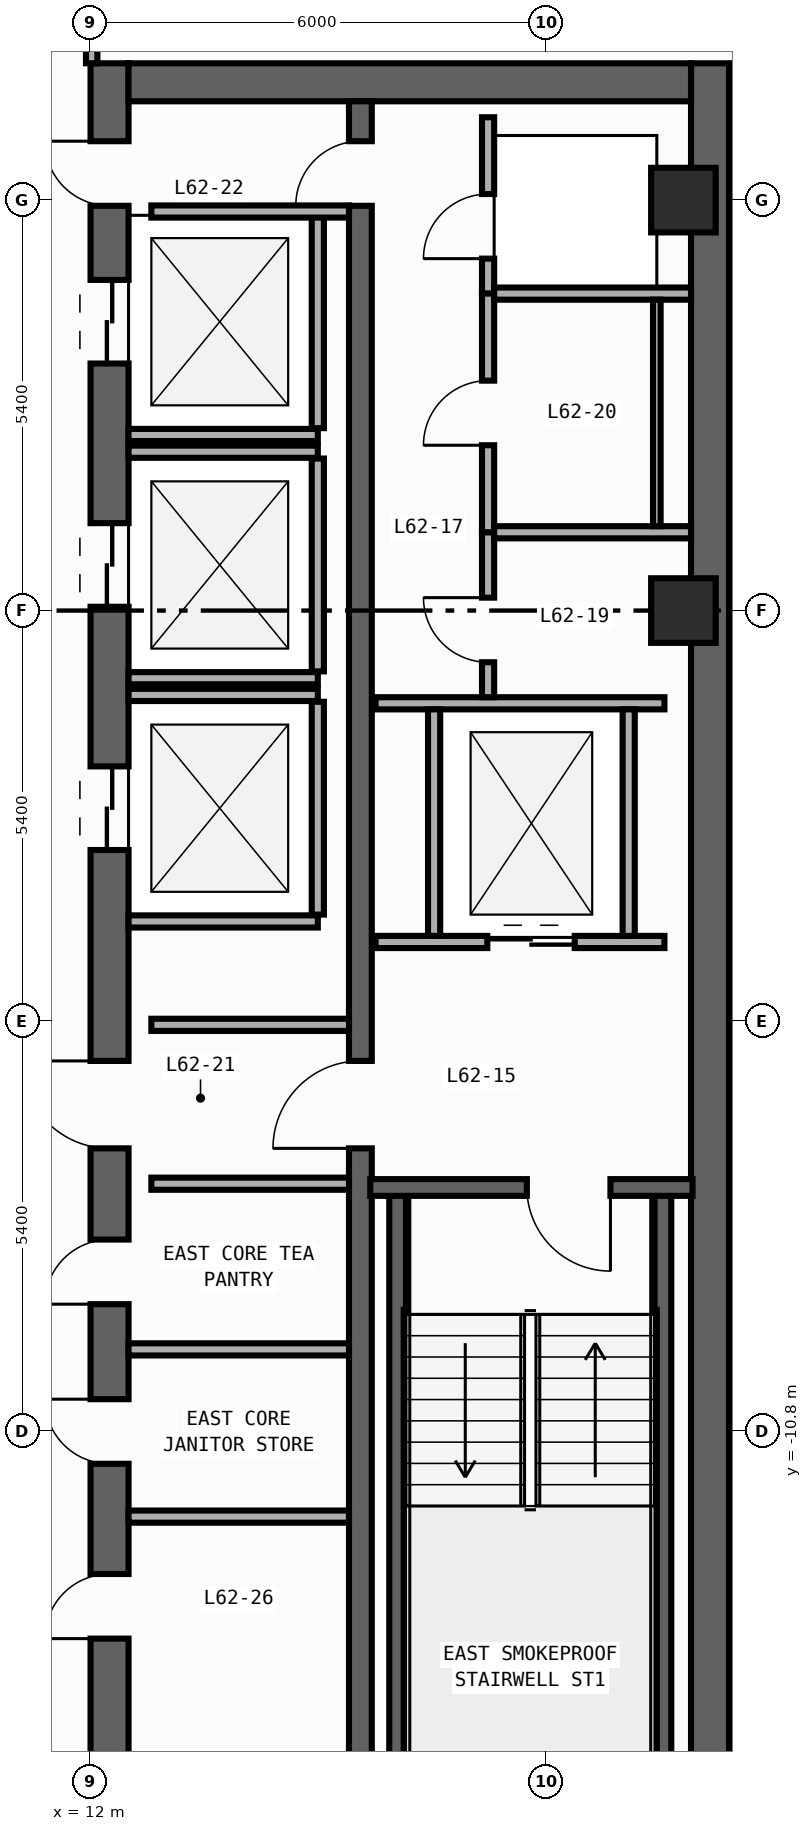
"""IFC4 building model, lengths in metres.
Left out: names, types, materials, properties, quantities, classifications, styles, units other than length and angle.
Written with IfcOpenShell. Run it as: python <this file> out.ifc"""

import sys

from ifc_helpers import new_model, si_unit, direction, frame, frame_2d, origin, origin_2d, place, context, subcontext, project, spatial, rectangle, extrude, element, fill, save


model = new_model("IFC4")
c1 = context("Model", 3, precision=1e-05, world=origin(), true_north=direction((0.0, 1.0)))
c2 = subcontext(c1, "Body", "Model", "MODEL_VIEW")
j1 = project(units=[si_unit("LENGTHUNIT", "METRE"), si_unit("PLANEANGLEUNIT", "RADIAN")], contexts=[c1])
p1 = place(None, origin())
s1 = spatial("IfcSite", under=j1, at=p1, CompositionType="ELEMENT")
p2 = place(p1, origin())
s2 = spatial("IfcBuilding", under=s1, at=p2, CompositionType="ELEMENT")
p3 = place(p2, frame((0.0, 0.0, 262.0)))
s3 = spatial("IfcBuildingStorey", under=s2, at=p3, CompositionType="ELEMENT", Elevation=262.0)
p4 = place(p3, frame((12.25, -19.8, 0.0), z_axis=(0.0, 0.0, 1.0), x_axis=(0.0, 1.0, 0.0)))
e1 = element("IfcWall", 1, at=p4, inside=s3, PredefinedType="SHEAR", context=c2, shape_type="SweptSolid", body=[
    extrude(rectangle(XDim=27.0, YDim=0.5, at=frame_2d((13.5, 0.0))), origin(), (0.0, 0.0, 1.0), 3.34),
])
p5 = place(p4, frame((23.05, 0.0, 0.0)))
e2 = element("IfcOpeningElement", 2, at=p5, cuts=e1, PredefinedType="OPENING", context=c2, shape_type="SweptSolid", body=[
    extrude(rectangle(XDim=1.1, YDim=2.2, at=frame_2d((0.55, 1.1))), frame((0.0, 0.26, 0.0), z_axis=(0.0, -1.0, 0.0), x_axis=(1.0, 0.0, 0.0)), (0.0, 0.0, 1.0), 0.52),
])
p6 = place(p4, frame((19.85, 0.0, 0.0)))
e3 = element("IfcOpeningElement", 3, at=p6, cuts=e1, PredefinedType="OPENING", context=c2, shape_type="SweptSolid", body=[
    extrude(rectangle(XDim=1.1, YDim=2.2, at=frame_2d((0.55, 1.1))), frame((0.0, 0.26, 0.0), z_axis=(0.0, -1.0, 0.0), x_axis=(1.0, 0.0, 0.0)), (0.0, 0.0, 1.0), 0.52),
])
p7 = place(p4, frame((16.65, 0.0, 0.0)))
e4 = element("IfcOpeningElement", 4, at=p7, cuts=e1, PredefinedType="OPENING", context=c2, shape_type="SweptSolid", body=[
    extrude(rectangle(XDim=1.1, YDim=2.2, at=frame_2d((0.55, 1.1))), frame((0.0, 0.26, 0.0), z_axis=(0.0, -1.0, 0.0), x_axis=(1.0, 0.0, 0.0)), (0.0, 0.0, 1.0), 0.52),
])
p8 = place(p4, frame((6.275, 0.0, 0.0)))
e5 = element("IfcOpeningElement", 5, at=p8, cuts=e1, PredefinedType="OPENING", context=c2, shape_type="SweptSolid", body=[
    extrude(rectangle(XDim=0.85, YDim=2.1, at=frame_2d((0.425, 1.05))), frame((0.0, 0.26, 0.0), z_axis=(0.0, -1.0, 0.0), x_axis=(1.0, 0.0, 0.0)), (0.0, 0.0, 1.0), 0.52),
])
p9 = place(p4, frame((8.575, 0.0, 0.0)))
e6 = element("IfcOpeningElement", 6, at=p9, cuts=e1, PredefinedType="OPENING", context=c2, shape_type="SweptSolid", body=[
    extrude(rectangle(XDim=0.85, YDim=2.1, at=frame_2d((0.425, 1.05))), frame((0.0, 0.26, 0.0), z_axis=(0.0, -1.0, 0.0), x_axis=(1.0, 0.0, 0.0)), (0.0, 0.0, 1.0), 0.52),
])
p10 = place(p4, frame((10.675, 0.0, 0.0)))
e7 = element("IfcOpeningElement", 7, at=p10, cuts=e1, PredefinedType="OPENING", context=c2, shape_type="SweptSolid", body=[
    extrude(rectangle(XDim=0.85, YDim=2.1, at=frame_2d((0.425, 1.05))), frame((0.0, 0.26, 0.0), z_axis=(0.0, -1.0, 0.0), x_axis=(1.0, 0.0, 0.0)), (0.0, 0.0, 1.0), 0.52),
])
p11 = place(p4, frame((12.725, 0.0, 0.0)))
e8 = element("IfcOpeningElement", 8, at=p11, cuts=e1, PredefinedType="OPENING", context=c2, shape_type="SweptSolid", body=[
    extrude(rectangle(XDim=1.15, YDim=2.2, at=frame_2d((0.575, 1.1))), frame((0.0, 0.26, 0.0), z_axis=(0.0, -1.0, 0.0), x_axis=(1.0, 0.0, 0.0)), (0.0, 0.0, 1.0), 0.52),
])
p12 = place(p4, frame((25.125, 0.0, 0.0)))
e9 = element("IfcOpeningElement", 9, at=p12, cuts=e1, PredefinedType="OPENING", context=c2, shape_type="SweptSolid", body=[
    extrude(rectangle(XDim=0.85, YDim=2.1, at=frame_2d((0.425, 1.05))), frame((0.0, 0.26, 0.0), z_axis=(0.0, -1.0, 0.0), x_axis=(1.0, 0.0, 0.0)), (0.0, 0.0, 1.0), 0.52),
])
p13 = place(p3, frame((20.15, -19.8, 0.0), z_axis=(0.0, 0.0, 1.0), x_axis=(0.0, 1.0, 0.0)))
e10 = element("IfcWall", 10, at=p13, inside=s3, PredefinedType="SHEAR", context=c2, shape_type="SweptSolid", body=[
    extrude(rectangle(XDim=27.0, YDim=0.5, at=frame_2d((13.5, 0.0))), origin(), (0.0, 0.0, 1.0), 3.34),
])
p14 = place(p3, frame((12.5, 6.95, 0.0), z_axis=(0.0, 0.0, 1.0), x_axis=(1.0, 0.0, 0.0)))
e11 = element("IfcWall", 11, at=p14, inside=s3, PredefinedType="SHEAR", context=c2, shape_type="SweptSolid", body=[
    extrude(rectangle(XDim=7.4, YDim=0.5, at=frame_2d((3.7, 0.0))), origin(), (0.0, 0.0, 1.0), 3.34),
])
p15 = place(p3, frame((15.55, -19.3, 0.0), z_axis=(0.0, 0.0, 1.0), x_axis=(0.0, 1.0, 0.0)))
e12 = element("IfcWall", 12, at=p15, inside=s3, PredefinedType="SHEAR", context=c2, shape_type="SweptSolid", body=[
    extrude(rectangle(XDim=26.0, YDim=0.3, at=frame_2d((13.0, 0.0))), origin(), (0.0, 0.0, 1.0), 3.34),
])
p16 = place(p15, frame((12.225, 0.0, 0.0)))
e13 = element("IfcOpeningElement", 13, at=p16, cuts=e12, PredefinedType="OPENING", context=c2, shape_type="SweptSolid", body=[
    extrude(rectangle(XDim=1.15, YDim=2.2, at=frame_2d((0.575, 1.1))), frame((0.0, 0.16, 0.0), z_axis=(0.0, -1.0, 0.0), x_axis=(1.0, 0.0, 0.0)), (0.0, 0.0, 1.0), 0.32),
])
p17 = place(p15, frame((24.625, 0.0, 0.0)))
e14 = element("IfcOpeningElement", 14, at=p17, cuts=e12, PredefinedType="OPENING", context=c2, shape_type="SweptSolid", body=[
    extrude(rectangle(XDim=0.85, YDim=2.1, at=frame_2d((0.425, 1.05))), frame((0.0, 0.16, 0.0), z_axis=(0.0, -1.0, 0.0), x_axis=(1.0, 0.0, 0.0)), (0.0, 0.0, 1.0), 0.32),
])
for number, where, z_axis, x_axis in (
    (15, (16.04, -19.01, 0.0), (0.0, 0.0, 1.0), (0.0, 1.0, 0.0)),
    (16, (19.53, -19.01, 0.0), (0.0, 0.0, 1.0), (0.0, 1.0, 0.0)),
):
    element("IfcWall", number, at=place(p3, frame(where, z_axis=z_axis, x_axis=x_axis)), inside=s3, PredefinedType="SHEAR", context=c2, shape_type="SweptSolid", body=[
        extrude(rectangle(XDim=11.42, YDim=0.22, at=frame_2d((5.71, 0.0))), origin(), (0.0, 0.0, 1.0), 3.34),
    ])
p18 = place(p3, frame((19.92, -7.59, 0.0), z_axis=(0.0, 0.0, 1.0), x_axis=(-1.0, 0.0, 0.0)))
e17 = element("IfcWall", 17, at=p18, inside=s3, PredefinedType="SHEAR", context=c2, shape_type="SweptSolid", body=[
    extrude(rectangle(XDim=4.24, YDim=0.22, at=frame_2d((2.12, 0.0))), origin(), (0.0, 0.0, 1.0), 3.34),
])
p19 = place(p18, frame((1.08, 0.0, 0.0)))
e18 = element("IfcOpeningElement", 18, at=p19, cuts=e17, PredefinedType="OPENING", context=c2, shape_type="SweptSolid", body=[
    extrude(rectangle(XDim=1.1, YDim=2.2, at=frame_2d((0.55, 1.1))), frame((0.0, 0.12, 0.0), z_axis=(0.0, -1.0, 0.0), x_axis=(1.0, 0.0, 0.0)), (0.0, 0.0, 1.0), 0.24),
])
for number, where, z_axis, x_axis in (
    (19, (19.8, 0.0, 0.0), (0.0, 0.0, 1.0), (1.0, 0.0, 0.0)),
    (20, (19.8, 5.4, 0.0), (0.0, 0.0, 1.0), (1.0, 0.0, 0.0)),
):
    element("IfcColumn", number, at=place(p3, frame(where, z_axis=z_axis, x_axis=x_axis)), inside=s3, PredefinedType="COLUMN", context=c2, shape_type="SweptSolid", body=[
        extrude(rectangle(XDim=0.85, YDim=0.85, at=origin_2d()), origin(), (0.0, 0.0, 1.0), 3.6),
    ])
p20 = place(p3, frame((12.5, 2.31, 0.0), z_axis=(0.0, 0.0, 1.0), x_axis=(1.0, 0.0, 0.0)))
e21 = element("IfcWall", 21, at=p20, inside=s3, PredefinedType="STANDARD", context=c2, shape_type="SweptSolid", body=[
    extrude(rectangle(XDim=2.49, YDim=0.16, at=frame_2d((1.245, 0.0))), origin(), (0.0, 0.0, 1.0), 3.34),
])
p21 = place(p3, frame((14.99, 2.4, 0.0), z_axis=(0.0, 0.0, 1.0), x_axis=(0.0, 1.0, 0.0)))
e22 = element("IfcWall", 22, at=p21, inside=s3, PredefinedType="STANDARD", context=c2, shape_type="SweptSolid", body=[
    extrude(rectangle(XDim=2.8, YDim=0.16, at=frame_2d((1.4, 0.0))), origin(), (0.0, 0.0, 1.0), 3.34),
])
for number, where, z_axis, x_axis in (
    (23, (12.5, -0.89, 0.0), (0.0, 0.0, 1.0), (1.0, 0.0, 0.0)),
    (24, (12.5, 2.09, 0.0), (0.0, 0.0, 1.0), (1.0, 0.0, 0.0)),
):
    element("IfcWall", number, at=place(p3, frame(where, z_axis=z_axis, x_axis=x_axis)), inside=s3, PredefinedType="STANDARD", context=c2, shape_type="SweptSolid", body=[
        extrude(rectangle(XDim=2.49, YDim=0.16, at=frame_2d((1.245, 0.0))), origin(), (0.0, 0.0, 1.0), 3.34),
    ])
p22 = place(p3, frame((14.99, -0.8, 0.0), z_axis=(0.0, 0.0, 1.0), x_axis=(0.0, 1.0, 0.0)))
e25 = element("IfcWall", 25, at=p22, inside=s3, PredefinedType="STANDARD", context=c2, shape_type="SweptSolid", body=[
    extrude(rectangle(XDim=2.8, YDim=0.16, at=frame_2d((1.4, 0.0))), origin(), (0.0, 0.0, 1.0), 3.34),
])
for number, where, z_axis, x_axis in (
    (26, (12.5, -4.09, 0.0), (0.0, 0.0, 1.0), (1.0, 0.0, 0.0)),
    (27, (12.5, -1.11, 0.0), (0.0, 0.0, 1.0), (1.0, 0.0, 0.0)),
):
    element("IfcWall", number, at=place(p3, frame(where, z_axis=z_axis, x_axis=x_axis)), inside=s3, PredefinedType="STANDARD", context=c2, shape_type="SweptSolid", body=[
        extrude(rectangle(XDim=2.49, YDim=0.16, at=frame_2d((1.245, 0.0))), origin(), (0.0, 0.0, 1.0), 3.34),
    ])
p23 = place(p3, frame((14.99, -4.0, 0.0), z_axis=(0.0, 0.0, 1.0), x_axis=(0.0, 1.0, 0.0)))
e28 = element("IfcWall", 28, at=p23, inside=s3, PredefinedType="STANDARD", context=c2, shape_type="SweptSolid", body=[
    extrude(rectangle(XDim=2.8, YDim=0.16, at=frame_2d((1.4, 0.0))), origin(), (0.0, 0.0, 1.0), 3.34),
])
p24 = place(p3, frame((15.75, -4.36, 0.0), z_axis=(0.0, 0.0, 1.0), x_axis=(1.0, 0.0, 0.0)))
e29 = element("IfcWall", 29, at=p24, inside=s3, PredefinedType="STANDARD", context=c2, shape_type="SweptSolid", body=[
    extrude(rectangle(XDim=3.8, YDim=0.16, at=frame_2d((1.9, 0.0))), origin(), (0.0, 0.0, 1.0), 3.34),
])
p25 = place(p24, frame((1.47, 0.0, 0.0)))
e30 = element("IfcOpeningElement", 30, at=p25, cuts=e29, PredefinedType="OPENING", context=c2, shape_type="SweptSolid", body=[
    extrude(rectangle(XDim=1.15, YDim=2.2, at=frame_2d((0.575, 1.1))), frame((0.0, 0.09, 0.0), z_axis=(0.0, -1.0, 0.0), x_axis=(1.0, 0.0, 0.0)), (0.0, 0.0, 1.0), 0.18),
])
p26 = place(p3, frame((15.75, -1.22, 0.0), z_axis=(0.0, 0.0, 1.0), x_axis=(1.0, 0.0, 0.0)))
e31 = element("IfcWall", 31, at=p26, inside=s3, PredefinedType="STANDARD", context=c2, shape_type="SweptSolid", body=[
    extrude(rectangle(XDim=3.8, YDim=0.16, at=frame_2d((1.9, 0.0))), origin(), (0.0, 0.0, 1.0), 3.34),
])
for number, where, z_axis, x_axis in (
    (32, (16.52, -4.28, 0.0), (0.0, 0.0, 1.0), (0.0, 1.0, 0.0)),
    (33, (19.08, -4.28, 0.0), (0.0, 0.0, 1.0), (0.0, 1.0, 0.0)),
):
    element("IfcWall", number, at=place(p3, frame(where, z_axis=z_axis, x_axis=x_axis)), inside=s3, PredefinedType="STANDARD", context=c2, shape_type="SweptSolid", body=[
        extrude(rectangle(XDim=2.98, YDim=0.16, at=frame_2d((1.49, 0.0))), origin(), (0.0, 0.0, 1.0), 3.34),
    ])
for number, where, z_axis, x_axis in (
    (34, (12.8, -5.45, 0.0), (0.0, 0.0, 1.0), (1.0, 0.0, 0.0)),
    (35, (12.8, -7.54, 0.0), (0.0, 0.0, 1.0), (1.0, 0.0, 0.0)),
    (36, (12.8, 5.25, 0.0), (0.0, 0.0, 1.0), (1.0, 0.0, 0.0)),
):
    element("IfcWall", number, at=place(p3, frame(where, z_axis=z_axis, x_axis=x_axis)), inside=s3, PredefinedType="STANDARD", context=c2, shape_type="SweptSolid", body=[
        extrude(rectangle(XDim=2.6, YDim=0.16, at=frame_2d((1.3, 0.0))), origin(), (0.0, 0.0, 1.0), 3.34),
    ])
p27 = place(p3, frame((17.23, 4.17, 0.0), z_axis=(0.0, 0.0, 1.0), x_axis=(0.0, 1.0, 0.0)))
e37 = element("IfcWall", 37, at=p27, inside=s3, PredefinedType="PARTITIONING", context=c2, shape_type="SweptSolid", body=[
    extrude(rectangle(XDim=2.32, YDim=0.16, at=frame_2d((1.16, 0.0))), origin(), (0.0, 0.0, 1.0), 3.34),
])
p28 = place(p27, frame((0.46, 0.0, 0.0)))
e38 = element("IfcOpeningElement", 38, at=p28, cuts=e37, PredefinedType="OPENING", context=c2, shape_type="SweptSolid", body=[
    extrude(rectangle(XDim=0.85, YDim=2.1, at=frame_2d((0.425, 1.05))), frame((0.0, 0.09, 0.0), z_axis=(0.0, -1.0, 0.0), x_axis=(1.0, 0.0, 0.0)), (0.0, 0.0, 1.0), 0.18),
])
p29 = place(p3, frame((17.23, -1.14, 0.0), z_axis=(0.0, 0.0, 1.0), x_axis=(0.0, 1.0, 0.0)))
e39 = element("IfcWall", 39, at=p29, inside=s3, PredefinedType="PARTITIONING", context=c2, shape_type="SweptSolid", body=[
    extrude(rectangle(XDim=2.17, YDim=0.16, at=frame_2d((1.085, 0.0))), origin(), (0.0, 0.0, 1.0), 3.34),
])
p30 = place(p29, frame((0.46, 0.0, 0.0)))
e40 = element("IfcOpeningElement", 40, at=p30, cuts=e39, PredefinedType="OPENING", context=c2, shape_type="SweptSolid", body=[
    extrude(rectangle(XDim=0.85, YDim=2.1, at=frame_2d((0.425, 1.05))), frame((0.0, 0.09, 0.0), z_axis=(0.0, -1.0, 0.0), x_axis=(1.0, 0.0, 0.0)), (0.0, 0.0, 1.0), 0.18),
])
p31 = place(p3, frame((17.23, 1.03, 0.0), z_axis=(0.0, 0.0, 1.0), x_axis=(0.0, 1.0, 0.0)))
e41 = element("IfcWall", 41, at=p31, inside=s3, PredefinedType="PARTITIONING", context=c2, shape_type="SweptSolid", body=[
    extrude(rectangle(XDim=3.14, YDim=0.16, at=frame_2d((1.57, 0.0))), origin(), (0.0, 0.0, 1.0), 3.34),
])
p32 = place(p31, frame((1.145, 0.0, 0.0)))
e42 = element("IfcOpeningElement", 42, at=p32, cuts=e41, PredefinedType="OPENING", context=c2, shape_type="SweptSolid", body=[
    extrude(rectangle(XDim=0.85, YDim=2.1, at=frame_2d((0.425, 1.05))), frame((0.0, 0.09, 0.0), z_axis=(0.0, -1.0, 0.0), x_axis=(1.0, 0.0, 0.0)), (0.0, 0.0, 1.0), 0.18),
])
for number, where, z_axis, x_axis in (
    (43, (17.31, 4.17, 0.0), (0.0, 0.0, 1.0), (1.0, 0.0, 0.0)),
    (44, (17.31, 1.03, 0.0), (0.0, 0.0, 1.0), (1.0, 0.0, 0.0)),
):
    element("IfcWall", number, at=place(p3, frame(where, z_axis=z_axis, x_axis=x_axis)), inside=s3, PredefinedType="PARTITIONING", context=c2, shape_type="SweptSolid", body=[
        extrude(rectangle(XDim=2.59, YDim=0.16, at=frame_2d((1.295, 0.0))), origin(), (0.0, 0.0, 1.0), 3.34),
    ])
for number, where, z_axis, x_axis in (
    (45, (12.5, -11.92, 0.0), (0.0, 0.0, 1.0), (1.0, 0.0, 0.0)),
    (46, (12.5, -9.72, 0.0), (0.0, 0.0, 1.0), (1.0, 0.0, 0.0)),
):
    element("IfcWall", number, at=place(p3, frame(where, z_axis=z_axis, x_axis=x_axis)), inside=s3, PredefinedType="PARTITIONING", context=c2, shape_type="SweptSolid", body=[
        extrude(rectangle(XDim=2.9, YDim=0.16, at=frame_2d((1.45, 0.0))), origin(), (0.0, 0.0, 1.0), 3.34),
    ])
p33 = place(p3, frame((12.015, 7.2, 0.0), z_axis=(0.0, 0.0, 1.0), x_axis=(0.0, 1.0, 0.0)))
e47 = element("IfcWall", 47, at=p33, inside=s3, PredefinedType="PARTITIONING", context=c2, shape_type="SweptSolid", body=[
    extrude(rectangle(XDim=6.52, YDim=0.15, at=frame_2d((3.26, 0.0))), origin(), (0.0, 0.0, 1.0), 3.34),
])
p34 = place(p33, frame((0.67, 0.0, 0.0)))
e48 = element("IfcOpeningElement", 48, at=p34, cuts=e47, PredefinedType="OPENING", context=c2, shape_type="SweptSolid", body=[
    extrude(rectangle(XDim=0.9, YDim=2.15, at=frame_2d((0.45, 1.075))), frame((0.0, 0.085, 0.0), z_axis=(0.0, -1.0, 0.0), x_axis=(1.0, 0.0, 0.0)), (0.0, 0.0, 1.0), 0.17),
])
p35 = place(p3, frame((19.45, 4.09, 0.0), z_axis=(0.0, 0.0, 1.0), x_axis=(0.0, -1.0, 0.0)))
e49 = element("IfcWall", 49, at=p35, inside=s3, PredefinedType="PARTITIONING", context=c2, shape_type="SweptSolid", body=[
    extrude(rectangle(XDim=2.98, YDim=0.1, at=frame_2d((1.49, 0.0))), origin(), (0.0, 0.0, 1.0), 3.34),
])
p36 = place(p19, origin())
e50 = element("IfcDoor", 50, at=p36, inside=s3, OperationType="SINGLE_SWING_LEFT", PredefinedType="DOOR", context=c2, shape_type="SweptSolid", body=[
    extrude(rectangle(XDim=1.1, YDim=2.2, at=frame_2d((0.55, 1.1))), frame((0.0, 0.025, 0.0), z_axis=(0.0, -1.0, 0.0), x_axis=(1.0, 0.0, 0.0)), (0.0, 0.0, 1.0), 0.05),
])
fill(e18, e50)
p37 = place(p5, origin())
e51 = element("IfcDoor", 51, at=p37, inside=s3, OperationType="DOUBLE_DOOR_SLIDING", PredefinedType="DOOR", context=c2, shape_type="SweptSolid", body=[
    extrude(rectangle(XDim=1.1, YDim=2.2, at=frame_2d((0.55, 1.1))), frame((0.0, 0.025, 0.0), z_axis=(0.0, -1.0, 0.0), x_axis=(1.0, 0.0, 0.0)), (0.0, 0.0, 1.0), 0.05),
])
fill(e2, e51)
p38 = place(p6, origin())
e52 = element("IfcDoor", 52, at=p38, inside=s3, OperationType="DOUBLE_DOOR_SLIDING", PredefinedType="DOOR", context=c2, shape_type="SweptSolid", body=[
    extrude(rectangle(XDim=1.1, YDim=2.2, at=frame_2d((0.55, 1.1))), frame((0.0, 0.025, 0.0), z_axis=(0.0, -1.0, 0.0), x_axis=(1.0, 0.0, 0.0)), (0.0, 0.0, 1.0), 0.05),
])
fill(e3, e52)
p39 = place(p7, origin())
e53 = element("IfcDoor", 53, at=p39, inside=s3, OperationType="DOUBLE_DOOR_SLIDING", PredefinedType="DOOR", context=c2, shape_type="SweptSolid", body=[
    extrude(rectangle(XDim=1.1, YDim=2.2, at=frame_2d((0.55, 1.1))), frame((0.0, 0.025, 0.0), z_axis=(0.0, -1.0, 0.0), x_axis=(1.0, 0.0, 0.0)), (0.0, 0.0, 1.0), 0.05),
])
fill(e4, e53)
p40 = place(p8, origin())
e54 = element("IfcDoor", 54, at=p40, inside=s3, OperationType="SINGLE_SWING_LEFT", PredefinedType="DOOR", context=c2, shape_type="SweptSolid", body=[
    extrude(rectangle(XDim=0.85, YDim=2.1, at=frame_2d((0.425, 1.05))), frame((0.0, 0.025, 0.0), z_axis=(0.0, -1.0, 0.0), x_axis=(1.0, 0.0, 0.0)), (0.0, 0.0, 1.0), 0.05),
])
fill(e5, e54)
p41 = place(p9, origin())
e55 = element("IfcDoor", 55, at=p41, inside=s3, OperationType="SINGLE_SWING_RIGHT", PredefinedType="DOOR", context=c2, shape_type="SweptSolid", body=[
    extrude(rectangle(XDim=0.85, YDim=2.1, at=frame_2d((0.425, 1.05))), frame((0.0, 0.025, 0.0), z_axis=(0.0, -1.0, 0.0), x_axis=(1.0, 0.0, 0.0)), (0.0, 0.0, 1.0), 0.05),
])
fill(e6, e55)
p42 = place(p10, origin())
e56 = element("IfcDoor", 56, at=p42, inside=s3, OperationType="SINGLE_SWING_LEFT", PredefinedType="DOOR", context=c2, shape_type="SweptSolid", body=[
    extrude(rectangle(XDim=0.85, YDim=2.1, at=frame_2d((0.425, 1.05))), frame((0.0, 0.025, 0.0), z_axis=(0.0, -1.0, 0.0), x_axis=(1.0, 0.0, 0.0)), (0.0, 0.0, 1.0), 0.05),
])
fill(e7, e56)
p43 = place(p11, origin())
e57 = element("IfcDoor", 57, at=p43, inside=s3, OperationType="SINGLE_SWING_RIGHT", PredefinedType="DOOR", context=c2, shape_type="SweptSolid", body=[
    extrude(rectangle(XDim=1.15, YDim=2.2, at=frame_2d((0.575, 1.1))), frame((0.0, 0.025, 0.0), z_axis=(0.0, -1.0, 0.0), x_axis=(1.0, 0.0, 0.0)), (0.0, 0.0, 1.0), 0.05),
])
fill(e8, e57)
p44 = place(p16, origin())
e58 = element("IfcDoor", 58, at=p44, inside=s3, OperationType="SINGLE_SWING_LEFT", PredefinedType="DOOR", context=c2, shape_type="SweptSolid", body=[
    extrude(rectangle(XDim=1.15, YDim=2.2, at=frame_2d((0.575, 1.1))), frame((0.0, 0.025, 0.0), z_axis=(0.0, -1.0, 0.0), x_axis=(1.0, 0.0, 0.0)), (0.0, 0.0, 1.0), 0.05),
])
fill(e13, e58)
p45 = place(p12, origin())
e59 = element("IfcDoor", 59, at=p45, inside=s3, OperationType="SINGLE_SWING_RIGHT", PredefinedType="DOOR", context=c2, shape_type="SweptSolid", body=[
    extrude(rectangle(XDim=0.85, YDim=2.1, at=frame_2d((0.425, 1.05))), frame((0.0, 0.025, 0.0), z_axis=(0.0, -1.0, 0.0), x_axis=(1.0, 0.0, 0.0)), (0.0, 0.0, 1.0), 0.05),
])
fill(e9, e59)
p46 = place(p17, origin())
e60 = element("IfcDoor", 60, at=p46, inside=s3, OperationType="SINGLE_SWING_LEFT", PredefinedType="DOOR", context=c2, shape_type="SweptSolid", body=[
    extrude(rectangle(XDim=0.85, YDim=2.1, at=frame_2d((0.425, 1.05))), frame((0.0, 0.025, 0.0), z_axis=(0.0, -1.0, 0.0), x_axis=(1.0, 0.0, 0.0)), (0.0, 0.0, 1.0), 0.05),
])
fill(e14, e60)
p47 = place(p25, origin())
e61 = element("IfcDoor", 61, at=p47, inside=s3, OperationType="DOUBLE_DOOR_SLIDING", PredefinedType="DOOR", context=c2, shape_type="SweptSolid", body=[
    extrude(rectangle(XDim=1.15, YDim=2.2, at=frame_2d((0.575, 1.1))), frame((0.0, 0.025, 0.0), z_axis=(0.0, -1.0, 0.0), x_axis=(1.0, 0.0, 0.0)), (0.0, 0.0, 1.0), 0.05),
])
fill(e30, e61)
p48 = place(p28, origin())
e62 = element("IfcDoor", 62, at=p48, inside=s3, OperationType="SINGLE_SWING_LEFT", PredefinedType="DOOR", context=c2, shape_type="SweptSolid", body=[
    extrude(rectangle(XDim=0.85, YDim=2.1, at=frame_2d((0.425, 1.05))), frame((0.0, 0.025, 0.0), z_axis=(0.0, -1.0, 0.0), x_axis=(1.0, 0.0, 0.0)), (0.0, 0.0, 1.0), 0.05),
])
fill(e38, e62)
p49 = place(p30, origin())
e63 = element("IfcDoor", 63, at=p49, inside=s3, OperationType="SINGLE_SWING_RIGHT", PredefinedType="DOOR", context=c2, shape_type="SweptSolid", body=[
    extrude(rectangle(XDim=0.85, YDim=2.1, at=frame_2d((0.425, 1.05))), frame((0.0, 0.025, 0.0), z_axis=(0.0, -1.0, 0.0), x_axis=(1.0, 0.0, 0.0)), (0.0, 0.0, 1.0), 0.05),
])
fill(e40, e63)
p50 = place(p32, origin())
e64 = element("IfcDoor", 64, at=p50, inside=s3, OperationType="SINGLE_SWING_LEFT", PredefinedType="DOOR", context=c2, shape_type="SweptSolid", body=[
    extrude(rectangle(XDim=0.85, YDim=2.1, at=frame_2d((0.425, 1.05))), frame((0.0, 0.025, 0.0), z_axis=(0.0, -1.0, 0.0), x_axis=(1.0, 0.0, 0.0)), (0.0, 0.0, 1.0), 0.05),
])
fill(e42, e64)
save(model, sys.argv[1])
